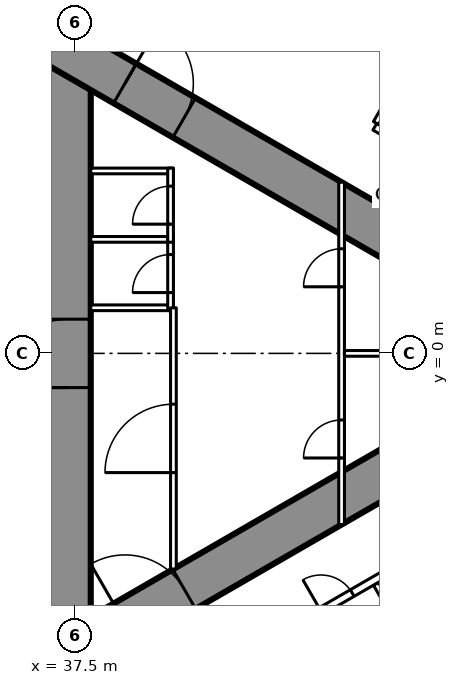
"""IFC4 building model, lengths in metres.
Left out: names, types, materials, properties, quantities, classifications, styles, units other than length and angle.
Written with IfcOpenShell. Run it as: python <this file> out.ifc"""

import sys

from ifc_helpers import new_model, si_unit, direction, frame, frame_2d, origin, place, context, subcontext, project, spatial, rectangle, extrude, element, fill, save


model = new_model("IFC4")
c1 = context("Model", 3, precision=1e-05, world=origin(), true_north=direction((0.0, 1.0)))
c2 = subcontext(c1, "Body", "Model", "MODEL_VIEW")
j1 = project(units=[si_unit("LENGTHUNIT", "METRE"), si_unit("PLANEANGLEUNIT", "RADIAN")], contexts=[c1])
p1 = place(None, origin())
s1 = spatial("IfcSite", under=j1, at=p1, CompositionType="ELEMENT")
p2 = place(p1, origin())
s2 = spatial("IfcBuilding", under=s1, at=p2, CompositionType="ELEMENT")
p3 = place(p2, frame((0.0, 0.0, 53.0)))
s3 = spatial("IfcBuildingStorey", under=s2, at=p3, CompositionType="ELEMENT", Elevation=53.0)
p4 = place(p3, frame((37.3, -8.6, 0.0), z_axis=(0.0, 0.0, 1.0), x_axis=(0.0, 1.0, 0.0)))
e1 = element("IfcWall", 1, at=p4, inside=s3, PredefinedType="SHEAR", context=c2, shape_type="SweptSolid", body=[
    extrude(rectangle(XDim=17.2, YDim=1.2, at=frame_2d((8.6, 0.0))), origin(), (0.0, 0.0, 1.0), 3.5),
])
p5 = place(p4, frame((7.7, 0.0, 0.0)))
e2 = element("IfcOpeningElement", 2, at=p5, cuts=e1, PredefinedType="OPENING", context=c2, shape_type="SweptSolid", body=[
    extrude(rectangle(XDim=1.8, YDim=2.2, at=frame_2d((0.9, 1.1))), frame((0.0, 0.61, 0.0), z_axis=(0.0, -1.0, 0.0), x_axis=(1.0, 0.0, 0.0)), (0.0, 0.0, 1.0), 1.22),
])
p6 = place(p3, frame((27.2, -13.8, 0.0), z_axis=(0.0, 0.0, 1.0), x_axis=(0.866027159892, 0.499996958321, 0.0)))
e3 = element("IfcWall", 3, at=p6, inside=s3, PredefinedType="SHEAR", context=c2, shape_type="SweptSolid", body=[
    extrude(rectangle(XDim=27.947, YDim=1.2, at=frame_2d((13.973, 0.0))), origin(), (0.0, 0.0, 1.0), 3.5),
])
p7 = place(p6, frame((4.6, 0.0, 0.0)))
e4 = element("IfcOpeningElement", 4, at=p7, cuts=e3, PredefinedType="OPENING", context=c2, shape_type="SweptSolid", body=[
    extrude(rectangle(XDim=1.0, YDim=2.2, at=frame_2d((0.5, 1.1))), frame((0.0, 0.61, 0.0), z_axis=(0.0, -1.0, 0.0), x_axis=(1.0, 0.0, 0.0)), (0.0, 0.0, 1.0), 1.22),
])
p8 = place(p6, frame((13.395, 0.0, 0.0)))
e5 = element("IfcOpeningElement", 5, at=p8, cuts=e3, PredefinedType="OPENING", context=c2, shape_type="SweptSolid", body=[
    extrude(rectangle(XDim=1.8, YDim=2.2, at=frame_2d((0.9, 1.1))), frame((0.0, 0.61, 0.0), z_axis=(0.0, -1.0, 0.0), x_axis=(1.0, 0.0, 0.0)), (0.0, 0.0, 1.0), 1.22),
])
p9 = place(p3, frame((27.2, 13.8, 0.0), z_axis=(0.0, 0.0, 1.0), x_axis=(0.866024515034, -0.500001539357, 0.0)))
e6 = element("IfcWall", 6, at=p9, inside=s3, PredefinedType="SHEAR", context=c2, shape_type="SweptSolid", body=[
    extrude(rectangle(XDim=26.907, YDim=1.2, at=frame_2d((13.454, 0.0))), origin(), (0.0, 0.0, 1.0), 3.5),
])
p10 = place(p9, frame((4.6, 0.0, 0.0)))
e7 = element("IfcOpeningElement", 7, at=p10, cuts=e6, PredefinedType="OPENING", context=c2, shape_type="SweptSolid", body=[
    extrude(rectangle(XDim=1.0, YDim=2.2, at=frame_2d((0.5, 1.1))), frame((0.0, 0.61, 0.0), z_axis=(0.0, -1.0, 0.0), x_axis=(1.0, 0.0, 0.0)), (0.0, 0.0, 1.0), 1.22),
])
p11 = place(p9, frame((13.395, 0.0, 0.0)))
e8 = element("IfcOpeningElement", 8, at=p11, cuts=e6, PredefinedType="OPENING", context=c2, shape_type="SweptSolid", body=[
    extrude(rectangle(XDim=1.8, YDim=2.2, at=frame_2d((0.9, 1.1))), frame((0.0, 0.61, 0.0), z_axis=(0.0, -1.0, 0.0), x_axis=(1.0, 0.0, 0.0)), (0.0, 0.0, 1.0), 1.22),
])
p12 = place(p3, frame((45.403, -6.062, 0.0), z_axis=(0.0, 0.0, 1.0), x_axis=(0.500007077968, -0.866021317279, 0.0)))
e9 = element("IfcWall", 9, at=p12, inside=s3, PredefinedType="PARTITIONING", context=c2, shape_type="SweptSolid", body=[
    extrude(rectangle(XDim=12.721, YDim=0.15, at=frame_2d((6.361, 0.0))), origin(), (0.0, 0.0, 1.0), 3.25),
])
p13 = place(p3, frame((45.403, 6.062, 0.0), z_axis=(0.0, 0.0, 1.0), x_axis=(0.500013434677, 0.866017647131, 0.0)))
e10 = element("IfcWall", 10, at=p13, inside=s3, PredefinedType="PARTITIONING", context=c2, shape_type="SweptSolid", body=[
    extrude(rectangle(XDim=9.902, YDim=0.15, at=frame_2d((4.951, 0.0))), origin(), (0.0, 0.0, 1.0), 2.25),
])
p14 = place(p3, frame((37.96, -10.243, 0.0), z_axis=(0.0, 0.0, 1.0), x_axis=(0.866026429433, 0.499998223521, 0.0)))
e11 = element("IfcWall", 11, at=p14, inside=s3, PredefinedType="PARTITIONING", context=c2, shape_type="SweptSolid", body=[
    extrude(rectangle(XDim=20.487, YDim=0.2, at=frame_2d((10.243, 0.0))), origin(), (0.0, 0.0, 1.0), 3.25),
])
p15 = place(p14, frame((6.925, 0.0, 0.0)))
e12 = element("IfcOpeningElement", 12, at=p15, cuts=e11, PredefinedType="OPENING", context=c2, shape_type="SweptSolid", body=[
    extrude(rectangle(XDim=0.95, YDim=2.2, at=frame_2d((0.475, 1.1))), frame((0.0, 0.11, 0.0), z_axis=(0.0, -1.0, 0.0), x_axis=(1.0, 0.0, 0.0)), (0.0, 0.0, 1.0), 0.22),
])
p16 = place(p14, frame((11.549, 0.0, 0.0)))
e13 = element("IfcOpeningElement", 13, at=p16, cuts=e11, PredefinedType="OPENING", context=c2, shape_type="SweptSolid", body=[
    extrude(rectangle(XDim=0.95, YDim=2.2, at=frame_2d((0.475, 1.1))), frame((0.0, 0.11, 0.0), z_axis=(0.0, -1.0, 0.0), x_axis=(1.0, 0.0, 0.0)), (0.0, 0.0, 1.0), 0.22),
])
p17 = place(p14, frame((13.249, 0.0, 0.0)))
e14 = element("IfcOpeningElement", 14, at=p17, cuts=e11, PredefinedType="OPENING", context=c2, shape_type="SweptSolid", body=[
    extrude(rectangle(XDim=0.95, YDim=2.2, at=frame_2d((0.475, 1.1))), frame((0.0, 0.11, 0.0), z_axis=(0.0, -1.0, 0.0), x_axis=(1.0, 0.0, 0.0)), (0.0, 0.0, 1.0), 0.22),
])
p18 = place(p14, frame((17.585, 0.0, 0.0)))
e15 = element("IfcOpeningElement", 15, at=p18, cuts=e11, PredefinedType="OPENING", context=c2, shape_type="SweptSolid", body=[
    extrude(rectangle(XDim=0.95, YDim=2.2, at=frame_2d((0.475, 1.1))), frame((0.0, 0.11, 0.0), z_axis=(0.0, -1.0, 0.0), x_axis=(1.0, 0.0, 0.0)), (0.0, 0.0, 1.0), 0.22),
])
p19 = place(p14, frame((0.6, 0.0, 0.0)))
e16 = element("IfcOpeningElement", 16, at=p19, cuts=e11, PredefinedType="OPENING", context=c2, shape_type="SweptSolid", body=[
    extrude(rectangle(XDim=0.95, YDim=2.2, at=frame_2d((0.475, 1.1))), frame((0.0, 0.11, 0.0), z_axis=(0.0, -1.0, 0.0), x_axis=(1.0, 0.0, 0.0)), (0.0, 0.0, 1.0), 0.22),
])
p20 = place(p3, frame((45.375, 5.963, 0.0), z_axis=(0.0, 0.0, 1.0), x_axis=(0.86603164725, -0.499989185844, 0.0)))
e17 = element("IfcWall", 17, at=p20, inside=s3, PredefinedType="PARTITIONING", context=c2, shape_type="SweptSolid", body=[
    extrude(rectangle(XDim=11.805, YDim=0.2, at=frame_2d((5.903, 0.0))), origin(), (0.0, 0.0, 1.0), 3.25),
])
p21 = place(p20, frame((9.024, 0.0, 0.0)))
e18 = element("IfcOpeningElement", 18, at=p21, cuts=e17, PredefinedType="OPENING", context=c2, shape_type="SweptSolid", body=[
    extrude(rectangle(XDim=0.95, YDim=2.2, at=frame_2d((0.475, 1.1))), frame((0.0, 0.11, 0.0), z_axis=(0.0, -1.0, 0.0), x_axis=(1.0, 0.0, 0.0)), (0.0, 0.0, 1.0), 0.22),
])
p22 = place(p20, frame((7.324, 0.0, 0.0)))
e19 = element("IfcOpeningElement", 19, at=p22, cuts=e17, PredefinedType="OPENING", context=c2, shape_type="SweptSolid", body=[
    extrude(rectangle(XDim=0.95, YDim=2.2, at=frame_2d((0.475, 1.1))), frame((0.0, 0.11, 0.0), z_axis=(0.0, -1.0, 0.0), x_axis=(1.0, 0.0, 0.0)), (0.0, 0.0, 1.0), 0.22),
])
for number, where, z_axis, x_axis in (
    (20, (37.9, 1.2, 0.0), (0.0, 0.0, 1.0), (1.0, 0.0, 0.0)),
    (21, (37.9, 3.0, 0.0), (0.0, 0.0, 1.0), (1.0, 0.0, 0.0)),
    (22, (37.9, 4.8, 0.0), (0.0, 0.0, 1.0), (1.0, 0.0, 0.0)),
):
    element("IfcWall", number, at=place(p3, frame(where, z_axis=z_axis, x_axis=x_axis)), inside=s3, PredefinedType="PARTITIONING", context=c2, shape_type="SweptSolid", body=[
        extrude(rectangle(XDim=2.175, YDim=0.15, at=frame_2d((1.087, 0.0))), origin(), (0.0, 0.0, 1.0), 3.25),
    ])
p23 = place(p3, frame((40.0, 1.125, 0.0), z_axis=(0.0, 0.0, 1.0), x_axis=(0.0, 1.0, 0.0)))
e23 = element("IfcWall", 23, at=p23, inside=s3, PredefinedType="PARTITIONING", context=c2, shape_type="SweptSolid", body=[
    extrude(rectangle(XDim=1.95, YDim=0.15, at=frame_2d((0.975, 0.0))), origin(), (0.0, 0.0, 1.0), 3.25),
])
p24 = place(p23, frame((0.475, 0.0, 0.0)))
e24 = element("IfcOpeningElement", 24, at=p24, cuts=e23, PredefinedType="OPENING", context=c2, shape_type="SweptSolid", body=[
    extrude(rectangle(XDim=1.0, YDim=2.2, at=frame_2d((0.5, 1.1))), frame((0.0, 0.085, 0.0), z_axis=(0.0, -1.0, 0.0), x_axis=(1.0, 0.0, 0.0)), (0.0, 0.0, 1.0), 0.17),
])
p25 = place(p3, frame((40.0, 2.925, 0.0), z_axis=(0.0, 0.0, 1.0), x_axis=(0.0, 1.0, 0.0)))
e25 = element("IfcWall", 25, at=p25, inside=s3, PredefinedType="PARTITIONING", context=c2, shape_type="SweptSolid", body=[
    extrude(rectangle(XDim=1.95, YDim=0.15, at=frame_2d((0.975, 0.0))), origin(), (0.0, 0.0, 1.0), 3.25),
])
p26 = place(p25, frame((0.475, 0.0, 0.0)))
e26 = element("IfcOpeningElement", 26, at=p26, cuts=e25, PredefinedType="OPENING", context=c2, shape_type="SweptSolid", body=[
    extrude(rectangle(XDim=1.0, YDim=2.2, at=frame_2d((0.5, 1.1))), frame((0.0, 0.085, 0.0), z_axis=(0.0, -1.0, 0.0), x_axis=(1.0, 0.0, 0.0)), (0.0, 0.0, 1.0), 0.17),
])
p27 = place(p3, frame((40.075, -5.674, 0.0), z_axis=(0.0, 0.0, 1.0), x_axis=(0.0, 1.0, 0.0)))
e27 = element("IfcWall", 27, at=p27, inside=s3, PredefinedType="PARTITIONING", context=c2, shape_type="SweptSolid", body=[
    extrude(rectangle(XDim=6.874, YDim=0.15, at=frame_2d((3.437, 0.0))), origin(), (0.0, 0.0, 1.0), 3.25),
])
p28 = place(p27, frame((2.537, 0.0, 0.0)))
e28 = element("IfcOpeningElement", 28, at=p28, cuts=e27, PredefinedType="OPENING", context=c2, shape_type="SweptSolid", body=[
    extrude(rectangle(XDim=1.8, YDim=2.2, at=frame_2d((0.9, 1.1))), frame((0.0, 0.085, 0.0), z_axis=(0.0, -1.0, 0.0), x_axis=(1.0, 0.0, 0.0)), (0.0, 0.0, 1.0), 0.17),
])
p29 = place(p3, frame((44.5, -4.505, 0.0), z_axis=(0.0, 0.0, 1.0), x_axis=(0.0, 1.0, 0.0)))
e29 = element("IfcWall", 29, at=p29, inside=s3, PredefinedType="PARTITIONING", context=c2, shape_type="SweptSolid", body=[
    extrude(rectangle(XDim=9.009, YDim=0.15, at=frame_2d((4.505, 0.0))), origin(), (0.0, 0.0, 1.0), 2.45),
])
p30 = place(p29, frame((1.752, 0.0, 0.0)))
e30 = element("IfcOpeningElement", 30, at=p30, cuts=e29, PredefinedType="OPENING", context=c2, shape_type="SweptSolid", body=[
    extrude(rectangle(XDim=1.0, YDim=2.2, at=frame_2d((0.5, 1.1))), frame((0.0, 0.085, 0.0), z_axis=(0.0, -1.0, 0.0), x_axis=(1.0, 0.0, 0.0)), (0.0, 0.0, 1.0), 0.17),
])
p31 = place(p29, frame((6.257, 0.0, 0.0)))
e31 = element("IfcOpeningElement", 31, at=p31, cuts=e29, PredefinedType="OPENING", context=c2, shape_type="SweptSolid", body=[
    extrude(rectangle(XDim=1.0, YDim=2.2, at=frame_2d((0.5, 1.1))), frame((0.0, 0.085, 0.0), z_axis=(0.0, -1.0, 0.0), x_axis=(1.0, 0.0, 0.0)), (0.0, 0.0, 1.0), 0.17),
])
p32 = place(p3, frame((44.575, 0.0, 0.0), z_axis=(0.0, 0.0, 1.0), x_axis=(1.0, 0.0, 0.0)))
e32 = element("IfcWall", 32, at=p32, inside=s3, PredefinedType="PARTITIONING", context=c2, shape_type="SweptSolid", body=[
    extrude(rectangle(XDim=7.727, YDim=0.15, at=frame_2d((3.864, 0.0))), origin(), (0.0, 0.0, 1.0), 2.25),
])
p33 = place(p15, origin())
e33 = element("IfcDoor", 33, at=p33, inside=s3, OperationType="SINGLE_SWING_LEFT", PredefinedType="DOOR", context=c2, shape_type="SweptSolid", body=[
    extrude(rectangle(XDim=0.95, YDim=2.2, at=frame_2d((0.475, 1.1))), frame((0.0, 0.025, 0.0), z_axis=(0.0, -1.0, 0.0), x_axis=(1.0, 0.0, 0.0)), (0.0, 0.0, 1.0), 0.05),
])
fill(e12, e33)
p34 = place(p24, origin())
e34 = element("IfcDoor", 34, at=p34, inside=s3, OperationType="SINGLE_SWING_LEFT", PredefinedType="DOOR", context=c2, shape_type="SweptSolid", body=[
    extrude(rectangle(XDim=1.0, YDim=2.2, at=frame_2d((0.5, 1.1))), frame((0.0, 0.025, 0.0), z_axis=(0.0, -1.0, 0.0), x_axis=(1.0, 0.0, 0.0)), (0.0, 0.0, 1.0), 0.05),
])
fill(e24, e34)
p35 = place(p26, origin())
e35 = element("IfcDoor", 35, at=p35, inside=s3, OperationType="SINGLE_SWING_LEFT", PredefinedType="DOOR", context=c2, shape_type="SweptSolid", body=[
    extrude(rectangle(XDim=1.0, YDim=2.2, at=frame_2d((0.5, 1.1))), frame((0.0, 0.025, 0.0), z_axis=(0.0, -1.0, 0.0), x_axis=(1.0, 0.0, 0.0)), (0.0, 0.0, 1.0), 0.05),
])
fill(e26, e35)
p36 = place(p28, origin())
e36 = element("IfcDoor", 36, at=p36, inside=s3, OperationType="DOUBLE_DOOR_SINGLE_SWING", PredefinedType="DOOR", context=c2, shape_type="SweptSolid", body=[
    extrude(rectangle(XDim=1.8, YDim=2.2, at=frame_2d((0.9, 1.1))), frame((0.0, 0.025, 0.0), z_axis=(0.0, -1.0, 0.0), x_axis=(1.0, 0.0, 0.0)), (0.0, 0.0, 1.0), 0.05),
])
fill(e28, e36)
p37 = place(p30, origin())
e37 = element("IfcDoor", 37, at=p37, inside=s3, OperationType="SINGLE_SWING_LEFT", PredefinedType="DOOR", context=c2, shape_type="SweptSolid", body=[
    extrude(rectangle(XDim=1.0, YDim=2.2, at=frame_2d((0.5, 1.1))), frame((0.0, 0.025, 0.0), z_axis=(0.0, -1.0, 0.0), x_axis=(1.0, 0.0, 0.0)), (0.0, 0.0, 1.0), 0.05),
])
fill(e30, e37)
p38 = place(p31, origin())
e38 = element("IfcDoor", 38, at=p38, inside=s3, OperationType="SINGLE_SWING_LEFT", PredefinedType="DOOR", context=c2, shape_type="SweptSolid", body=[
    extrude(rectangle(XDim=1.0, YDim=2.2, at=frame_2d((0.5, 1.1))), frame((0.0, 0.025, 0.0), z_axis=(0.0, -1.0, 0.0), x_axis=(1.0, 0.0, 0.0)), (0.0, 0.0, 1.0), 0.05),
])
fill(e31, e38)
p39 = place(p8, origin())
e39 = element("IfcDoor", 39, at=p39, inside=s3, OperationType="DOUBLE_DOOR_SINGLE_SWING", PredefinedType="DOOR", context=c2, shape_type="SweptSolid", body=[
    extrude(rectangle(XDim=1.8, YDim=2.2, at=frame_2d((0.9, 1.1))), frame((0.0, 0.025, 0.0), z_axis=(0.0, -1.0, 0.0), x_axis=(1.0, 0.0, 0.0)), (0.0, 0.0, 1.0), 0.05),
])
fill(e5, e39)
p40 = place(p11, origin())
e40 = element("IfcDoor", 40, at=p40, inside=s3, OperationType="DOUBLE_DOOR_SINGLE_SWING", PredefinedType="DOOR", context=c2, shape_type="SweptSolid", body=[
    extrude(rectangle(XDim=1.8, YDim=2.2, at=frame_2d((0.9, 1.1))), frame((0.0, 0.025, 0.0), z_axis=(0.0, -1.0, 0.0), x_axis=(1.0, 0.0, 0.0)), (0.0, 0.0, 1.0), 0.05),
])
fill(e8, e40)
p41 = place(p5, origin())
e41 = element("IfcDoor", 41, at=p41, inside=s3, OperationType="DOUBLE_DOOR_SINGLE_SWING", PredefinedType="DOOR", context=c2, shape_type="SweptSolid", body=[
    extrude(rectangle(XDim=1.8, YDim=2.2, at=frame_2d((0.9, 1.1))), frame((0.0, 0.025, 0.0), z_axis=(0.0, -1.0, 0.0), x_axis=(1.0, 0.0, 0.0)), (0.0, 0.0, 1.0), 0.05),
])
fill(e2, e41)
save(model, sys.argv[1])
